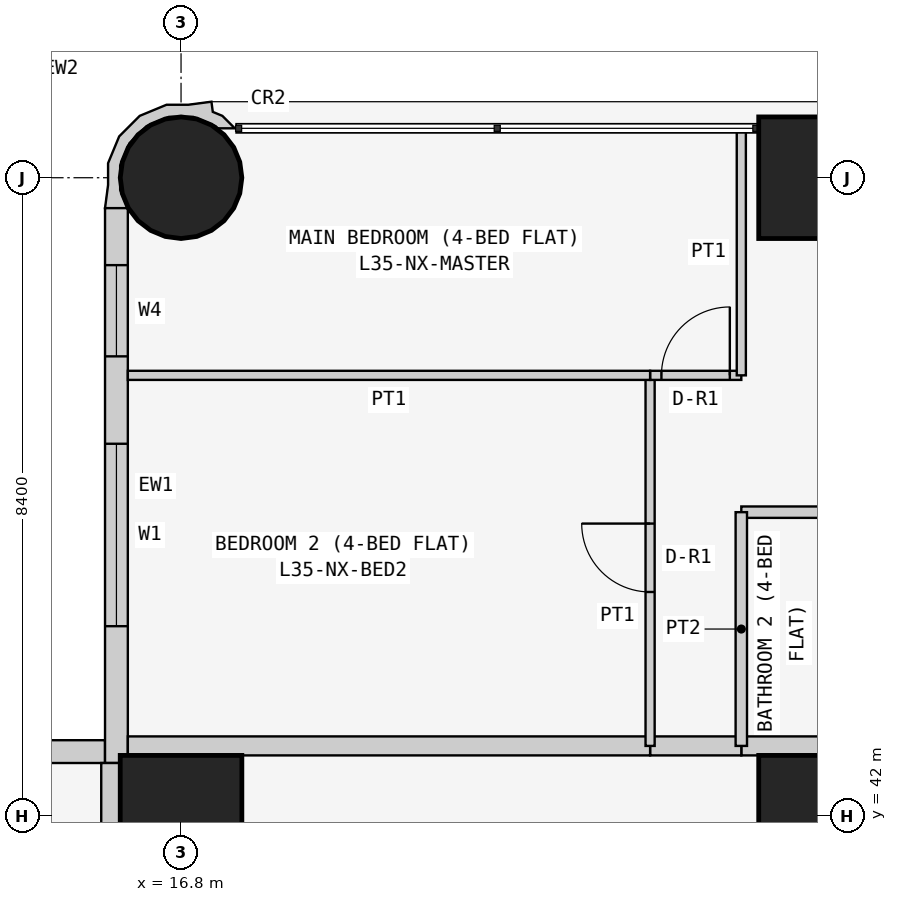
"""IFC4 building model, lengths in metres.
Left out: names, types, materials, properties, quantities, classifications, styles, units other than length and angle.
Written with IfcOpenShell. Run it as: python <this file> out.ifc"""

import sys

from ifc_helpers import new_model, si_unit, direction, frame, frame_2d, origin, origin_2d, place, context, subcontext, project, spatial, polyline, rectangle, circle, outline, extrude, element, fill, save


model = new_model("IFC4")
c1 = context("Model", 3, precision=1e-05, world=origin(), true_north=direction((0.0, 1.0)))
c2 = subcontext(c1, "Body", "Model", "MODEL_VIEW")
j1 = project(units=[si_unit("LENGTHUNIT", "METRE"), si_unit("PLANEANGLEUNIT", "RADIAN")], contexts=[c1])
p1 = place(None, origin())
s1 = spatial("IfcSite", under=j1, at=p1, CompositionType="ELEMENT")
p2 = place(p1, origin())
s2 = spatial("IfcBuilding", under=s1, at=p2, CompositionType="ELEMENT")
p3 = place(p2, frame((0.0, 0.0, 137.7)))
s3 = spatial("IfcBuildingStorey", under=s2, at=p3, CompositionType="ELEMENT", Elevation=137.7)
p4 = place(p3, frame((16.8, 42.0, 0.0), z_axis=(0.0, 0.0, 1.0), x_axis=(1.0, 0.0, 0.0)))
e1 = element("IfcColumn", 1, at=p4, inside=s3, PredefinedType="COLUMN", context=c2, shape_type="SweptSolid", body=[
    extrude(rectangle(XDim=1.6, YDim=1.6, at=origin_2d()), origin(), (0.0, 0.0, 1.0), 3.6),
])
p5 = place(p3, frame((16.8, 50.4, 0.0), z_axis=(0.0, 0.0, 1.0), x_axis=(1.0, 0.0, 0.0)))
e2 = element("IfcColumn", 2, at=p5, inside=s3, PredefinedType="COLUMN", context=c2, shape_type="SweptSolid", body=[
    extrude(circle(Radius=0.8, at=origin_2d()), origin(), (0.0, 0.0, 1.0), 3.6),
])
for number, where, z_axis, x_axis in (
    (3, (25.2, 42.0, 0.0), (0.0, 0.0, 1.0), (1.0, 0.0, 0.0)),
    (4, (25.2, 50.4, 0.0), (0.0, 0.0, 1.0), (1.0, 0.0, 0.0)),
):
    element("IfcColumn", number, at=place(p3, frame(where, z_axis=z_axis, x_axis=x_axis)), inside=s3, PredefinedType="COLUMN", context=c2, shape_type="SweptSolid", body=[
        extrude(rectangle(XDim=1.6, YDim=1.6, at=origin_2d()), origin(), (0.0, 0.0, 1.0), 3.6),
    ])
p6 = place(p3, frame((15.8, 42.85, 0.0), z_axis=(0.0, 0.0, 1.0), x_axis=(-1.0, 0.0, 0.0)))
e5 = element("IfcWall", 5, at=p6, inside=s3, PredefinedType="SOLIDWALL", context=c2, shape_type="SweptSolid", body=[
    extrude(rectangle(XDim=15.4, YDim=0.3, at=frame_2d((7.7, 0.0))), origin(), (0.0, 0.0, 1.0), 3.45),
])
p7 = place(p6, frame((1.2, 0.0, 0.9)))
e6 = element("IfcOpeningElement", 6, at=p7, cuts=e5, PredefinedType="OPENING", context=c2, shape_type="SweptSolid", body=[
    extrude(rectangle(XDim=1.8, YDim=1.5, at=frame_2d((0.9, 0.75))), frame((0.0, 0.16, 0.0), z_axis=(0.0, -1.0, 0.0), x_axis=(1.0, 0.0, 0.0)), (0.0, 0.0, 1.0), 0.32),
])
p8 = place(p6, frame((4.95, 0.0, 1.5)))
e7 = element("IfcOpeningElement", 7, at=p8, cuts=e5, PredefinedType="OPENING", context=c2, shape_type="SweptSolid", body=[
    extrude(rectangle(XDim=0.9, YDim=0.7, at=frame_2d((0.45, 0.35))), frame((0.0, 0.16, 0.0), z_axis=(0.0, -1.0, 0.0), x_axis=(1.0, 0.0, 0.0)), (0.0, 0.0, 1.0), 0.32),
])
p9 = place(p6, frame((8.5, 0.0, 0.9)))
e8 = element("IfcOpeningElement", 8, at=p9, cuts=e5, PredefinedType="OPENING", context=c2, shape_type="SweptSolid", body=[
    extrude(rectangle(XDim=1.8, YDim=1.5, at=frame_2d((0.9, 0.75))), frame((0.0, 0.16, 0.0), z_axis=(0.0, -1.0, 0.0), x_axis=(1.0, 0.0, 0.0)), (0.0, 0.0, 1.0), 0.32),
])
p10 = place(p6, frame((12.5, 0.0, 0.0)))
e9 = element("IfcOpeningElement", 9, at=p10, cuts=e5, PredefinedType="OPENING", context=c2, shape_type="SweptSolid", body=[
    extrude(rectangle(XDim=0.9, YDim=2.4, at=frame_2d((0.45, 1.2))), frame((0.0, 0.16, 0.0), z_axis=(0.0, -1.0, 0.0), x_axis=(1.0, 0.0, 0.0)), (0.0, 0.0, 1.0), 0.32),
])
p11 = place(p6, frame((13.5, 0.0, 0.9)))
e10 = element("IfcOpeningElement", 10, at=p11, cuts=e5, PredefinedType="OPENING", context=c2, shape_type="SweptSolid", body=[
    extrude(rectangle(XDim=1.2, YDim=1.5, at=frame_2d((0.6, 0.75))), frame((0.0, 0.16, 0.0), z_axis=(0.0, -1.0, 0.0), x_axis=(1.0, 0.0, 0.0)), (0.0, 0.0, 1.0), 0.32),
])
p12 = place(p3, frame((15.95, 50.0, 0.0), z_axis=(0.0, 0.0, 1.0), x_axis=(0.0, -1.0, 0.0)))
e11 = element("IfcWall", 11, at=p12, inside=s3, PredefinedType="SOLIDWALL", context=c2, shape_type="SweptSolid", body=[
    extrude(rectangle(XDim=7.3, YDim=0.3, at=frame_2d((3.65, 0.0))), origin(), (0.0, 0.0, 1.0), 3.45),
])
p13 = place(p12, frame((3.1, 0.0, 0.9)))
e12 = element("IfcOpeningElement", 12, at=p13, cuts=e11, PredefinedType="OPENING", context=c2, shape_type="SweptSolid", body=[
    extrude(rectangle(XDim=2.4, YDim=1.5, at=frame_2d((1.2, 0.75))), frame((0.0, 0.16, 0.0), z_axis=(0.0, -1.0, 0.0), x_axis=(1.0, 0.0, 0.0)), (0.0, 0.0, 1.0), 0.32),
])
p14 = place(p12, frame((0.75, 0.0, 0.9)))
e13 = element("IfcOpeningElement", 13, at=p14, cuts=e11, PredefinedType="OPENING", context=c2, shape_type="SweptSolid", body=[
    extrude(rectangle(XDim=1.2, YDim=1.5, at=frame_2d((0.6, 0.75))), frame((0.0, 0.16, 0.0), z_axis=(0.0, -1.0, 0.0), x_axis=(1.0, 0.0, 0.0)), (0.0, 0.0, 1.0), 0.32),
])
p15 = place(p3, frame((17.448, 50.995, 0.0), z_axis=(0.0, 0.0, 1.0), x_axis=(-0.343276641956, 0.93923434088, 0.0)))
e14 = element("IfcWall", 14, at=p15, inside=s3, PredefinedType="SOLIDWALL", context=c2, shape_type="SweptSolid", body=[
    extrude(outline(polyline([(0.241, 0.023), (0.333, 0.124), (0.465, 0.094), (0.532, 0.393), (0.631, 0.663), (0.614, 1.045), (0.454, 1.391), (0.172, 1.649), (-0.098, 1.748), (-0.369, 1.89), (-0.509, 1.621), (-0.491, 1.615), (-0.479, 1.609), (-0.211, 1.62), (0.088, 1.511), (0.323, 1.295), (0.457, 1.006), (0.47, 0.688), (0.361, 0.389), (0.145, 0.154), (0.108, 0.137), (0.031, -0.075), (0.241, 0.023)])), origin(), (0.0, 0.0, 1.0), 3.45),
])
p16 = place(p3, frame((24.171, 42.925, 0.0), z_axis=(0.0, 0.0, 1.0), x_axis=(1.0, 0.0, 0.0)))
e15 = element("IfcWall", 15, at=p16, inside=s3, PredefinedType="PARTITIONING", context=c2, shape_type="SweptSolid", body=[
    extrude(rectangle(XDim=2.629, YDim=0.25, at=frame_2d((1.314, 0.0))), origin(), (0.0, 0.0, 1.0), 3.45),
])
p17 = place(p3, frame((22.971, 42.925, 0.0), z_axis=(0.0, 0.0, 1.0), x_axis=(1.0, 0.0, 0.0)))
e16 = element("IfcWall", 16, at=p17, inside=s3, PredefinedType="PARTITIONING", context=c2, shape_type="SweptSolid", body=[
    extrude(rectangle(XDim=1.2, YDim=0.25, at=frame_2d((0.6, 0.0))), origin(), (0.0, 0.0, 1.0), 3.45),
])
p18 = place(p3, frame((16.1, 42.925, 0.0), z_axis=(0.0, 0.0, 1.0), x_axis=(1.0, 0.0, 0.0)))
e17 = element("IfcWall", 17, at=p18, inside=s3, PredefinedType="PARTITIONING", context=c2, shape_type="SweptSolid", body=[
    extrude(rectangle(XDim=6.871, YDim=0.25, at=frame_2d((3.436, 0.0))), origin(), (0.0, 0.0, 1.0), 3.45),
])
p19 = place(p3, frame((15.875, 36.229, 0.0), z_axis=(0.0, 0.0, 1.0), x_axis=(0.0, 1.0, 0.0)))
e18 = element("IfcWall", 18, at=p19, inside=s3, PredefinedType="PARTITIONING", context=c2, shape_type="SweptSolid", body=[
    extrude(rectangle(XDim=6.471, YDim=0.25, at=frame_2d((3.235, 0.0))), origin(), (0.0, 0.0, 1.0), 3.45),
])
p20 = place(p3, frame((26.8, 46.0, 0.0), z_axis=(0.0, 0.0, 1.0), x_axis=(-1.0, 0.0, 0.0)))
e19 = element("IfcWall", 19, at=p20, inside=s3, PredefinedType="PARTITIONING", context=c2, shape_type="SweptSolid", body=[
    extrude(rectangle(XDim=2.629, YDim=0.15, at=frame_2d((1.314, 0.0))), origin(), (0.0, 0.0, 1.0), 3.45),
])
p21 = place(p3, frame((24.171, 46.0, 0.0), z_axis=(0.0, 0.0, 1.0), x_axis=(0.0, -1.0, 0.0)))
e20 = element("IfcWall", 20, at=p21, inside=s3, PredefinedType="PARTITIONING", context=c2, shape_type="SweptSolid", body=[
    extrude(rectangle(XDim=3.075, YDim=0.15, at=frame_2d((1.538, 0.0))), origin(), (0.0, 0.0, 1.0), 3.45),
])
p22 = place(p3, frame((22.971, 42.925, 0.0), z_axis=(0.0, 0.0, 1.0), x_axis=(0.0, 1.0, 0.0)))
e21 = element("IfcWall", 21, at=p22, inside=s3, PredefinedType="PARTITIONING", context=c2, shape_type="SweptSolid", body=[
    extrude(rectangle(XDim=4.875, YDim=0.12, at=frame_2d((2.438, 0.0))), origin(), (0.0, 0.0, 1.0), 3.45),
])
p23 = place(p22, frame((2.025, 0.0, 0.0)))
e22 = element("IfcOpeningElement", 22, at=p23, cuts=e21, PredefinedType="OPENING", context=c2, shape_type="SweptSolid", body=[
    extrude(rectangle(XDim=0.9, YDim=2.1, at=frame_2d((0.45, 1.05))), frame((0.0, 0.07, 0.0), z_axis=(0.0, -1.0, 0.0), x_axis=(1.0, 0.0, 0.0)), (0.0, 0.0, 1.0), 0.14),
])
p24 = place(p3, frame((22.971, 47.8, 0.0), z_axis=(0.0, 0.0, 1.0), x_axis=(1.0, 0.0, 0.0)))
e23 = element("IfcWall", 23, at=p24, inside=s3, PredefinedType="PARTITIONING", context=c2, shape_type="SweptSolid", body=[
    extrude(rectangle(XDim=1.2, YDim=0.12, at=frame_2d((0.6, 0.0))), origin(), (0.0, 0.0, 1.0), 3.45),
])
p25 = place(p24, frame((0.149, 0.0, 0.0)))
e24 = element("IfcOpeningElement", 24, at=p25, cuts=e23, PredefinedType="OPENING", context=c2, shape_type="SweptSolid", body=[
    extrude(rectangle(XDim=0.9, YDim=2.1, at=frame_2d((0.45, 1.05))), frame((0.0, 0.07, 0.0), z_axis=(0.0, -1.0, 0.0), x_axis=(1.0, 0.0, 0.0)), (0.0, 0.0, 1.0), 0.14),
])
p26 = place(p3, frame((24.171, 47.8, 0.0), z_axis=(0.0, 0.0, 1.0), x_axis=(0.0, 1.0, 0.0)))
e25 = element("IfcWall", 25, at=p26, inside=s3, PredefinedType="PARTITIONING", context=c2, shape_type="SweptSolid", body=[
    extrude(rectangle(XDim=3.25, YDim=0.12, at=frame_2d((1.625, 0.0))), origin(), (0.0, 0.0, 1.0), 3.45),
])
p27 = place(p3, frame((22.971, 47.8, 0.0), z_axis=(0.0, 0.0, 1.0), x_axis=(-1.0, 0.0, 0.0)))
e26 = element("IfcWall", 26, at=p27, inside=s3, PredefinedType="PARTITIONING", context=c2, shape_type="SweptSolid", body=[
    extrude(rectangle(XDim=6.871, YDim=0.12, at=frame_2d((3.436, 0.0))), origin(), (0.0, 0.0, 1.0), 3.45),
])
p28 = place(p13, origin())
e27 = element("IfcWindow", 27, at=p28, inside=s3, PartitioningType="SINGLE_PANEL", PredefinedType="WINDOW", context=c2, shape_type="SweptSolid", body=[
    extrude(rectangle(XDim=2.4, YDim=1.5, at=frame_2d((1.2, 0.75))), frame((0.0, 0.03, 0.0), z_axis=(0.0, -1.0, 0.0), x_axis=(1.0, 0.0, 0.0)), (0.0, 0.0, 1.0), 0.06),
])
fill(e12, e27)
p29 = place(p14, origin())
e28 = element("IfcWindow", 28, at=p29, inside=s3, PartitioningType="SINGLE_PANEL", PredefinedType="WINDOW", context=c2, shape_type="SweptSolid", body=[
    extrude(rectangle(XDim=1.2, YDim=1.5, at=frame_2d((0.6, 0.75))), frame((0.0, 0.03, 0.0), z_axis=(0.0, -1.0, 0.0), x_axis=(1.0, 0.0, 0.0)), (0.0, 0.0, 1.0), 0.06),
])
fill(e13, e28)
p30 = place(p23, origin())
e29 = element("IfcDoor", 29, at=p30, inside=s3, OperationType="SINGLE_SWING_RIGHT", PredefinedType="DOOR", context=c2, shape_type="SweptSolid", body=[
    extrude(rectangle(XDim=0.9, YDim=2.1, at=frame_2d((0.45, 1.05))), frame((0.0, 0.025, 0.0), z_axis=(0.0, -1.0, 0.0), x_axis=(1.0, 0.0, 0.0)), (0.0, 0.0, 1.0), 0.05),
])
fill(e22, e29)
p31 = place(p25, origin())
e30 = element("IfcDoor", 30, at=p31, inside=s3, OperationType="SINGLE_SWING_RIGHT", PredefinedType="DOOR", context=c2, shape_type="SweptSolid", body=[
    extrude(rectangle(XDim=0.9, YDim=2.1, at=frame_2d((0.45, 1.05))), frame((0.0, 0.025, 0.0), z_axis=(0.0, -1.0, 0.0), x_axis=(1.0, 0.0, 0.0)), (0.0, 0.0, 1.0), 0.05),
])
fill(e24, e30)
save(model, sys.argv[1])
